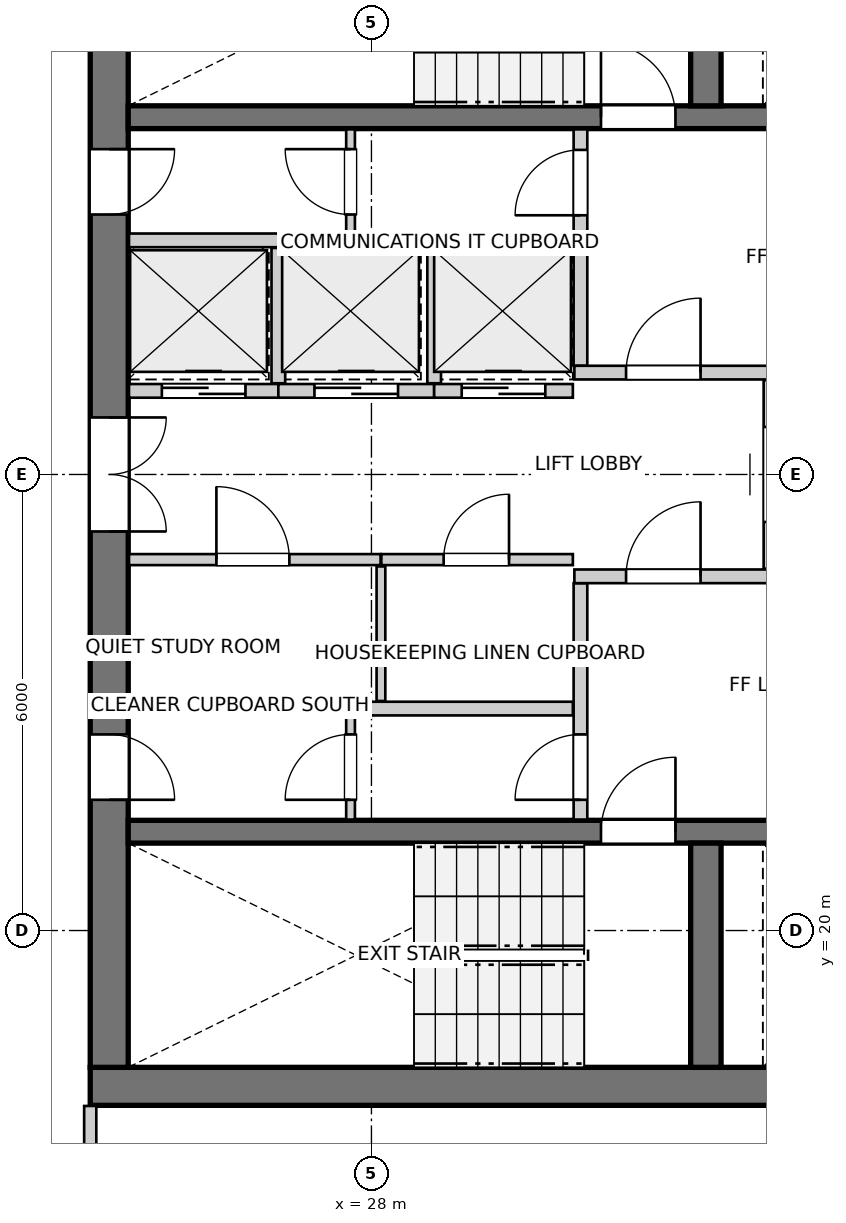
"""IFC4 building model, lengths in metres.
Left out: names, types, materials, properties, quantities, classifications, styles, units other than length and angle.
Written with IfcOpenShell. Run it as: python <this file> out.ifc"""

import sys

from ifc_helpers import new_model, si_unit, direction, frame, frame_2d, origin, place, context, subcontext, project, spatial, rectangle, extrude, source, transform, mapped, element, fill, save


model = new_model("IFC4")
c1 = context("Model", 3, precision=1e-05, world=origin(), true_north=direction((0.0, 1.0)))
c2 = subcontext(c1, "Body", "Model", "MODEL_VIEW")
j1 = project(units=[si_unit("LENGTHUNIT", "METRE"), si_unit("PLANEANGLEUNIT", "RADIAN")], contexts=[c1])
p1 = place(None, origin())
s1 = spatial("IfcSite", under=j1, at=p1, CompositionType="ELEMENT")
p2 = place(p1, origin())
s2 = spatial("IfcBuilding", under=s1, at=p2, CompositionType="ELEMENT")
p3 = place(p2, frame((0.0, 0.0, 211.6)))
s3 = spatial("IfcBuildingStorey", under=s2, at=p3, CompositionType="ELEMENT", Elevation=211.6)
p4 = place(p3, frame((24.3, 17.95, 0.0), z_axis=(0.0, 0.0, 1.0), x_axis=(1.0, 0.0, 0.0)))
e1 = element("IfcWall", 1, at=p4, inside=s3, PredefinedType="SHEAR", context=c2, shape_type="SweptSolid", body=[
    extrude(rectangle(XDim=12.1, YDim=0.5, at=frame_2d((6.05, 0.0))), origin(), (0.0, 0.0, 1.0), 2.96),
])
p5 = place(p3, frame((24.55, 33.8, 0.0), z_axis=(0.0, 0.0, 1.0), x_axis=(0.0, -1.0, 0.0)))
e2 = element("IfcWall", 2, at=p5, inside=s3, PredefinedType="SHEAR", context=c2, shape_type="SweptSolid", body=[
    extrude(rectangle(XDim=15.6, YDim=0.5, at=frame_2d((7.8, 0.0))), origin(), (0.0, 0.0, 1.0), 2.96),
])
p6 = place(p5, frame((7.05, 0.0, 0.0)))
e3 = element("IfcOpeningElement", 3, at=p6, cuts=e2, PredefinedType="OPENING", context=c2, shape_type="SweptSolid", body=[
    extrude(rectangle(XDim=1.5, YDim=2.15, at=frame_2d((0.75, 1.075))), frame((0.0, 0.26, 0.0), z_axis=(0.0, -1.0, 0.0), x_axis=(1.0, 0.0, 0.0)), (0.0, 0.0, 1.0), 0.52),
])
p7 = place(p5, frame((3.52, 0.0, 0.0)))
e4 = element("IfcOpeningElement", 4, at=p7, cuts=e2, PredefinedType="OPENING", context=c2, shape_type="SweptSolid", body=[
    extrude(rectangle(XDim=0.86, YDim=2.05, at=frame_2d((0.43, 1.025))), frame((0.0, 0.26, 0.0), z_axis=(0.0, -1.0, 0.0), x_axis=(1.0, 0.0, 0.0)), (0.0, 0.0, 1.0), 0.52),
])
p8 = place(p5, frame((11.22, 0.0, 0.0)))
e5 = element("IfcOpeningElement", 5, at=p8, cuts=e2, PredefinedType="OPENING", context=c2, shape_type="SweptSolid", body=[
    extrude(rectangle(XDim=0.86, YDim=2.05, at=frame_2d((0.43, 1.025))), frame((0.0, 0.26, 0.0), z_axis=(0.0, -1.0, 0.0), x_axis=(1.0, 0.0, 0.0)), (0.0, 0.0, 1.0), 0.52),
])
p9 = place(p3, frame((24.8, 21.3, 0.0), z_axis=(0.0, 0.0, 1.0), x_axis=(1.0, 0.0, 0.0)))
e6 = element("IfcWall", 6, at=p9, inside=s3, PredefinedType="SHEAR", context=c2, shape_type="SweptSolid", body=[
    extrude(rectangle(XDim=11.1, YDim=0.3, at=frame_2d((5.55, 0.0))), origin(), (0.0, 0.0, 1.0), 2.96),
])
p10 = place(p9, frame((6.22, 0.0, 0.0)))
e7 = element("IfcOpeningElement", 7, at=p10, cuts=e6, PredefinedType="OPENING", context=c2, shape_type="SweptSolid", body=[
    extrude(rectangle(XDim=0.98, YDim=2.15, at=frame_2d((0.49, 1.075))), frame((0.0, 0.16, 0.0), z_axis=(0.0, -1.0, 0.0), x_axis=(1.0, 0.0, 0.0)), (0.0, 0.0, 1.0), 0.32),
])
p11 = place(p9, frame((9.15, 0.0, 0.0)))
e8 = element("IfcOpeningElement", 8, at=p11, cuts=e6, PredefinedType="OPENING", context=c2, shape_type="SweptSolid", body=[
    extrude(rectangle(XDim=1.15, YDim=2.15, at=frame_2d((0.575, 1.075))), frame((0.0, 0.16, 0.0), z_axis=(0.0, -1.0, 0.0), x_axis=(1.0, 0.0, 0.0)), (0.0, 0.0, 1.0), 0.32),
])
p12 = place(p3, frame((32.4, 18.2, 0.0), z_axis=(0.0, 0.0, 1.0), x_axis=(0.0, 1.0, 0.0)))
e9 = element("IfcWall", 9, at=p12, inside=s3, PredefinedType="SHEAR", context=c2, shape_type="SweptSolid", body=[
    extrude(rectangle(XDim=2.95, YDim=0.4, at=frame_2d((1.475, 0.0))), origin(), (0.0, 0.0, 1.0), 2.96),
])
p13 = place(p3, frame((24.8, 30.7, 0.0), z_axis=(0.0, 0.0, 1.0), x_axis=(1.0, 0.0, 0.0)))
e10 = element("IfcWall", 10, at=p13, inside=s3, PredefinedType="SHEAR", context=c2, shape_type="SweptSolid", body=[
    extrude(rectangle(XDim=11.1, YDim=0.3, at=frame_2d((5.55, 0.0))), origin(), (0.0, 0.0, 1.0), 2.96),
])
p14 = place(p13, frame((6.22, 0.0, 0.0)))
e11 = element("IfcOpeningElement", 11, at=p14, cuts=e10, PredefinedType="OPENING", context=c2, shape_type="SweptSolid", body=[
    extrude(rectangle(XDim=0.98, YDim=2.15, at=frame_2d((0.49, 1.075))), frame((0.0, 0.16, 0.0), z_axis=(0.0, -1.0, 0.0), x_axis=(1.0, 0.0, 0.0)), (0.0, 0.0, 1.0), 0.32),
])
p15 = place(p13, frame((9.15, 0.0, 0.0)))
e12 = element("IfcOpeningElement", 12, at=p15, cuts=e10, PredefinedType="OPENING", context=c2, shape_type="SweptSolid", body=[
    extrude(rectangle(XDim=1.15, YDim=2.15, at=frame_2d((0.575, 1.075))), frame((0.0, 0.16, 0.0), z_axis=(0.0, -1.0, 0.0), x_axis=(1.0, 0.0, 0.0)), (0.0, 0.0, 1.0), 0.32),
])
p16 = place(p3, frame((32.4, 30.85, 0.0), z_axis=(0.0, 0.0, 1.0), x_axis=(0.0, 1.0, 0.0)))
e13 = element("IfcWall", 13, at=p16, inside=s3, PredefinedType="SHEAR", context=c2, shape_type="SweptSolid", body=[
    extrude(rectangle(XDim=2.95, YDim=0.4, at=frame_2d((1.475, 0.0))), origin(), (0.0, 0.0, 1.0), 2.96),
])
p17 = place(p3, frame((30.75, 21.46, 0.0), z_axis=(0.0, 0.0, 1.0), x_axis=(0.0, 1.0, 0.0)))
e14 = element("IfcWall", 14, at=p17, inside=s3, PredefinedType="PARTITIONING", context=c2, shape_type="SweptSolid", body=[
    extrude(rectangle(XDim=3.11, YDim=0.18, at=frame_2d((1.555, 0.0))), origin(), (0.0, 0.0, 1.0), 2.96),
])
p18 = place(p17, frame((0.26, 0.0, 0.0)))
e15 = element("IfcOpeningElement", 15, at=p18, cuts=e14, PredefinedType="OPENING", context=c2, shape_type="SweptSolid", body=[
    extrude(rectangle(XDim=0.86, YDim=2.05, at=frame_2d((0.43, 1.025))), frame((0.0, 0.1, 0.0), z_axis=(0.0, -1.0, 0.0), x_axis=(1.0, 0.0, 0.0)), (0.0, 0.0, 1.0), 0.2),
])
p19 = place(p3, frame((30.67, 24.66, 0.0), z_axis=(0.0, 0.0, 1.0), x_axis=(1.0, 0.0, 0.0)))
e16 = element("IfcWall", 16, at=p19, inside=s3, PredefinedType="PARTITIONING", context=c2, shape_type="SweptSolid", body=[
    extrude(rectangle(XDim=5.22, YDim=0.18, at=frame_2d((2.61, 0.0))), origin(), (0.0, 0.0, 1.0), 2.96),
])
p20 = place(p19, frame((0.68, 0.0, 0.0)))
e17 = element("IfcOpeningElement", 17, at=p20, cuts=e16, PredefinedType="OPENING", context=c2, shape_type="SweptSolid", body=[
    extrude(rectangle(XDim=0.98, YDim=2.15, at=frame_2d((0.49, 1.075))), frame((0.0, 0.1, 0.0), z_axis=(0.0, -1.0, 0.0), x_axis=(1.0, 0.0, 0.0)), (0.0, 0.0, 1.0), 0.2),
])
p21 = place(p3, frame((30.75, 27.43, 0.0), z_axis=(0.0, 0.0, 1.0), x_axis=(0.0, 1.0, 0.0)))
e18 = element("IfcWall", 18, at=p21, inside=s3, PredefinedType="PARTITIONING", context=c2, shape_type="SweptSolid", body=[
    extrude(rectangle(XDim=3.11, YDim=0.18, at=frame_2d((1.555, 0.0))), origin(), (0.0, 0.0, 1.0), 2.96),
])
p22 = place(p21, frame((1.98, 0.0, 0.0)))
e19 = element("IfcOpeningElement", 19, at=p22, cuts=e18, PredefinedType="OPENING", context=c2, shape_type="SweptSolid", body=[
    extrude(rectangle(XDim=0.86, YDim=2.05, at=frame_2d((0.43, 1.025))), frame((0.0, 0.1, 0.0), z_axis=(0.0, -1.0, 0.0), x_axis=(1.0, 0.0, 0.0)), (0.0, 0.0, 1.0), 0.2),
])
p23 = place(p3, frame((30.67, 27.34, 0.0), z_axis=(0.0, 0.0, 1.0), x_axis=(1.0, 0.0, 0.0)))
e20 = element("IfcWall", 20, at=p23, inside=s3, PredefinedType="PARTITIONING", context=c2, shape_type="SweptSolid", body=[
    extrude(rectangle(XDim=5.22, YDim=0.18, at=frame_2d((2.61, 0.0))), origin(), (0.0, 0.0, 1.0), 2.96),
])
p24 = place(p23, frame((0.68, 0.0, 0.0)))
e21 = element("IfcOpeningElement", 21, at=p24, cuts=e20, PredefinedType="OPENING", context=c2, shape_type="SweptSolid", body=[
    extrude(rectangle(XDim=0.98, YDim=2.15, at=frame_2d((0.49, 1.075))), frame((0.0, 0.1, 0.0), z_axis=(0.0, -1.0, 0.0), x_axis=(1.0, 0.0, 0.0)), (0.0, 0.0, 1.0), 0.2),
])
p25 = place(p3, frame((33.25, 24.76, 0.0), z_axis=(0.0, 0.0, 1.0), x_axis=(0.0, 1.0, 0.0)))
e22 = element("IfcWall", 22, at=p25, inside=s3, PredefinedType="PARTITIONING", context=c2, shape_type="SweptSolid", body=[
    extrude(rectangle(XDim=2.48, YDim=0.18, at=frame_2d((1.24, 0.0))), origin(), (0.0, 0.0, 1.0), 2.96),
])
p26 = place(p25, frame((0.615, 0.0, 0.0)))
e23 = element("IfcOpeningElement", 23, at=p26, cuts=e22, PredefinedType="OPENING", context=c2, shape_type="SweptSolid", body=[
    extrude(rectangle(XDim=1.25, YDim=2.15, at=frame_2d((0.625, 1.075))), frame((0.0, 0.1, 0.0), z_axis=(0.0, -1.0, 0.0), x_axis=(1.0, 0.0, 0.0)), (0.0, 0.0, 1.0), 0.2),
])
p27 = place(p3, frame((24.81, 22.92, 0.0), z_axis=(0.0, 0.0, 1.0), x_axis=(1.0, 0.0, 0.0)))
e24 = element("IfcWall", 24, at=p27, inside=s3, PredefinedType="PARTITIONING", context=c2, shape_type="SweptSolid", body=[
    extrude(rectangle(XDim=5.84, YDim=0.18, at=frame_2d((2.92, 0.0))), origin(), (0.0, 0.0, 1.0), 2.96),
])
p28 = place(p3, frame((24.81, 24.88, 0.0), z_axis=(0.0, 0.0, 1.0), x_axis=(1.0, 0.0, 0.0)))
e25 = element("IfcWall", 25, at=p28, inside=s3, PredefinedType="PARTITIONING", context=c2, shape_type="SweptSolid", body=[
    extrude(rectangle(XDim=3.31, YDim=0.145, at=frame_2d((1.655, 0.0))), origin(), (0.0, 0.0, 1.0), 2.96),
])
p29 = place(p28, frame((1.15, 0.0, 0.0)))
e26 = element("IfcOpeningElement", 26, at=p29, cuts=e25, PredefinedType="OPENING", context=c2, shape_type="SweptSolid", body=[
    extrude(rectangle(XDim=0.96, YDim=2.1, at=frame_2d((0.48, 1.05))), frame((0.0, 0.083, 0.0), z_axis=(0.0, -1.0, 0.0), x_axis=(1.0, 0.0, 0.0)), (0.0, 0.0, 1.0), 0.165),
])
p30 = place(p3, frame((28.13, 24.88, 0.0), z_axis=(0.0, 0.0, 1.0), x_axis=(1.0, 0.0, 0.0)))
e27 = element("IfcWall", 27, at=p30, inside=s3, PredefinedType="PARTITIONING", context=c2, shape_type="SweptSolid", body=[
    extrude(rectangle(XDim=2.52, YDim=0.145, at=frame_2d((1.26, 0.0))), origin(), (0.0, 0.0, 1.0), 2.96),
])
p31 = place(p30, frame((0.82, 0.0, 0.0)))
e28 = element("IfcOpeningElement", 28, at=p31, cuts=e27, PredefinedType="OPENING", context=c2, shape_type="SweptSolid", body=[
    extrude(rectangle(XDim=0.86, YDim=2.05, at=frame_2d((0.43, 1.025))), frame((0.0, 0.083, 0.0), z_axis=(0.0, -1.0, 0.0), x_axis=(1.0, 0.0, 0.0)), (0.0, 0.0, 1.0), 0.165),
])
p32 = place(p3, frame((28.125, 23.02, 0.0), z_axis=(0.0, 0.0, 1.0), x_axis=(0.0, 1.0, 0.0)))
e29 = element("IfcWall", 29, at=p32, inside=s3, PredefinedType="PARTITIONING", context=c2, shape_type="SweptSolid", body=[
    extrude(rectangle(XDim=1.77, YDim=0.115, at=frame_2d((0.885, 0.0))), origin(), (0.0, 0.0, 1.0), 2.96),
])
p33 = place(p3, frame((24.81, 29.08, 0.0), z_axis=(0.0, 0.0, 1.0), x_axis=(1.0, 0.0, 0.0)))
e30 = element("IfcWall", 30, at=p33, inside=s3, PredefinedType="PARTITIONING", context=c2, shape_type="SweptSolid", body=[
    extrude(rectangle(XDim=5.84, YDim=0.18, at=frame_2d((2.92, 0.0))), origin(), (0.0, 0.0, 1.0), 2.96),
])
p34 = place(p3, frame((24.81, 27.1, 0.0), z_axis=(0.0, 0.0, 1.0), x_axis=(1.0, 0.0, 0.0)))
e31 = element("IfcWall", 31, at=p34, inside=s3, PredefinedType="PARTITIONING", context=c2, shape_type="SweptSolid", body=[
    extrude(rectangle(XDim=1.965, YDim=0.18, at=frame_2d((0.982, 0.0))), origin(), (0.0, 0.0, 1.0), 2.96),
])
p35 = place(p34, frame((0.433, 0.0, 0.0)))
e32 = element("IfcOpeningElement", 32, at=p35, cuts=e31, PredefinedType="OPENING", context=c2, shape_type="SweptSolid", body=[
    extrude(rectangle(XDim=1.1, YDim=2.15, at=frame_2d((0.55, 1.075))), frame((0.0, 0.1, 0.0), z_axis=(0.0, -1.0, 0.0), x_axis=(1.0, 0.0, 0.0)), (0.0, 0.0, 1.0), 0.2),
])
p36 = place(p3, frame((26.775, 27.1, 0.0), z_axis=(0.0, 0.0, 1.0), x_axis=(1.0, 0.0, 0.0)))
e33 = element("IfcWall", 33, at=p36, inside=s3, PredefinedType="PARTITIONING", context=c2, shape_type="SweptSolid", body=[
    extrude(rectangle(XDim=2.05, YDim=0.18, at=frame_2d((1.025, 0.0))), origin(), (0.0, 0.0, 1.0), 2.96),
])
p37 = place(p36, frame((0.475, 0.0, 0.0)))
e34 = element("IfcOpeningElement", 34, at=p37, cuts=e33, PredefinedType="OPENING", context=c2, shape_type="SweptSolid", body=[
    extrude(rectangle(XDim=1.1, YDim=2.15, at=frame_2d((0.55, 1.075))), frame((0.0, 0.1, 0.0), z_axis=(0.0, -1.0, 0.0), x_axis=(1.0, 0.0, 0.0)), (0.0, 0.0, 1.0), 0.2),
])
p38 = place(p3, frame((26.775, 27.2, 0.0), z_axis=(0.0, 0.0, 1.0), x_axis=(0.0, 1.0, 0.0)))
e35 = element("IfcWall", 35, at=p38, inside=s3, PredefinedType="PARTITIONING", context=c2, shape_type="SweptSolid", body=[
    extrude(rectangle(XDim=1.78, YDim=0.18, at=frame_2d((0.89, 0.0))), origin(), (0.0, 0.0, 1.0), 2.96),
])
p39 = place(p3, frame((28.825, 27.1, 0.0), z_axis=(0.0, 0.0, 1.0), x_axis=(1.0, 0.0, 0.0)))
e36 = element("IfcWall", 36, at=p39, inside=s3, PredefinedType="PARTITIONING", context=c2, shape_type="SweptSolid", body=[
    extrude(rectangle(XDim=1.825, YDim=0.18, at=frame_2d((0.913, 0.0))), origin(), (0.0, 0.0, 1.0), 2.96),
])
p40 = place(p39, frame((0.363, 0.0, 0.0)))
e37 = element("IfcOpeningElement", 37, at=p40, cuts=e36, PredefinedType="OPENING", context=c2, shape_type="SweptSolid", body=[
    extrude(rectangle(XDim=1.1, YDim=2.15, at=frame_2d((0.55, 1.075))), frame((0.0, 0.1, 0.0), z_axis=(0.0, -1.0, 0.0), x_axis=(1.0, 0.0, 0.0)), (0.0, 0.0, 1.0), 0.2),
])
p41 = place(p3, frame((28.825, 27.2, 0.0), z_axis=(0.0, 0.0, 1.0), x_axis=(0.0, 1.0, 0.0)))
e38 = element("IfcWall", 38, at=p41, inside=s3, PredefinedType="PARTITIONING", context=c2, shape_type="SweptSolid", body=[
    extrude(rectangle(XDim=1.78, YDim=0.18, at=frame_2d((0.89, 0.0))), origin(), (0.0, 0.0, 1.0), 2.96),
])
p42 = place(p3, frame((27.725, 21.46, 0.0), z_axis=(0.0, 0.0, 1.0), x_axis=(0.0, 1.0, 0.0)))
e39 = element("IfcWall", 39, at=p42, inside=s3, PredefinedType="PARTITIONING", context=c2, shape_type="SweptSolid", body=[
    extrude(rectangle(XDim=1.38, YDim=0.115, at=frame_2d((0.69, 0.0))), origin(), (0.0, 0.0, 1.0), 2.96),
])
p43 = place(p42, frame((0.26, 0.0, 0.0)))
e40 = element("IfcOpeningElement", 40, at=p43, cuts=e39, PredefinedType="OPENING", context=c2, shape_type="SweptSolid", body=[
    extrude(rectangle(XDim=0.86, YDim=2.05, at=frame_2d((0.43, 1.025))), frame((0.0, 0.067, 0.0), z_axis=(0.0, -1.0, 0.0), x_axis=(1.0, 0.0, 0.0)), (0.0, 0.0, 1.0), 0.135),
])
p44 = place(p3, frame((27.725, 29.16, 0.0), z_axis=(0.0, 0.0, 1.0), x_axis=(0.0, 1.0, 0.0)))
e41 = element("IfcWall", 41, at=p44, inside=s3, PredefinedType="PARTITIONING", context=c2, shape_type="SweptSolid", body=[
    extrude(rectangle(XDim=1.38, YDim=0.115, at=frame_2d((0.69, 0.0))), origin(), (0.0, 0.0, 1.0), 2.96),
])
p45 = place(p44, frame((0.26, 0.0, 0.0)))
e42 = element("IfcOpeningElement", 42, at=p45, cuts=e41, PredefinedType="OPENING", context=c2, shape_type="SweptSolid", body=[
    extrude(rectangle(XDim=0.86, YDim=2.05, at=frame_2d((0.43, 1.025))), frame((0.0, 0.067, 0.0), z_axis=(0.0, -1.0, 0.0), x_axis=(1.0, 0.0, 0.0)), (0.0, 0.0, 1.0), 0.135),
])
p46 = place(p3, frame((24.3, 15.002, 0.0), z_axis=(0.0, 0.0, 1.0), x_axis=(0.0, 1.0, 0.0)))
e43 = element("IfcWall", 43, at=p46, inside=s3, PredefinedType="PARTITIONING", context=c2, shape_type="SweptSolid", body=[
    extrude(rectangle(XDim=2.69, YDim=0.16, at=frame_2d((1.345, 0.0))), origin(), (0.0, 0.0, 1.0), 2.96),
])
m1 = source(origin(), c2, "Body", "SweptSolid", [
    extrude(rectangle(XDim=0.98, YDim=2.15, at=frame_2d((0.49, 1.075))), frame((0.0, 0.025, 0.0), z_axis=(0.0, -1.0, 0.0), x_axis=(1.0, 0.0, 0.0)), (0.0, 0.0, 1.0), 0.05),
])
p47 = place(p10, origin())
e44 = element("IfcDoor", 44, at=p47, inside=s3, OperationType="SINGLE_SWING_RIGHT", PredefinedType="DOOR", context=c2, shape_type="MappedRepresentation", body=[
    mapped(m1, transform((0.0, 0.0, 0.0), x_axis=(1.0, 0.0, 0.0), y_axis=(0.0, 1.0, 0.0), z_axis=(0.0, 0.0, 1.0), scale=1.0)),
])
fill(e7, e44)
p48 = place(p14, origin())
e45 = element("IfcDoor", 45, at=p48, inside=s3, OperationType="SINGLE_SWING_LEFT", PredefinedType="DOOR", context=c2, shape_type="MappedRepresentation", body=[
    mapped(m1, transform((0.0, 0.0, 0.0), x_axis=(1.0, 0.0, 0.0), y_axis=(0.0, 1.0, 0.0), z_axis=(0.0, 0.0, 1.0), scale=1.0)),
])
fill(e11, e45)
m2 = source(origin(), c2, "Body", "SweptSolid", [
    extrude(rectangle(XDim=1.5, YDim=2.15, at=frame_2d((0.75, 1.075))), frame((0.0, 0.025, 0.0), z_axis=(0.0, -1.0, 0.0), x_axis=(1.0, 0.0, 0.0)), (0.0, 0.0, 1.0), 0.05),
])
p49 = place(p6, origin())
e46 = element("IfcDoor", 46, at=p49, inside=s3, OperationType="DOUBLE_DOOR_SINGLE_SWING", PredefinedType="DOOR", context=c2, shape_type="MappedRepresentation", body=[
    mapped(m2, transform((0.0, 0.0, 0.0), x_axis=(1.0, 0.0, 0.0), y_axis=(0.0, 1.0, 0.0), z_axis=(0.0, 0.0, 1.0), scale=1.0)),
])
fill(e3, e46)
m3 = source(origin(), c2, "Body", "SweptSolid", [
    extrude(rectangle(XDim=0.86, YDim=2.05, at=frame_2d((0.43, 1.025))), frame((0.0, 0.025, 0.0), z_axis=(0.0, -1.0, 0.0), x_axis=(1.0, 0.0, 0.0)), (0.0, 0.0, 1.0), 0.05),
])
p50 = place(p7, origin())
e47 = element("IfcDoor", 47, at=p50, inside=s3, OperationType="SINGLE_SWING_LEFT", PredefinedType="DOOR", context=c2, shape_type="MappedRepresentation", body=[
    mapped(m3, transform((0.0, 0.0, 0.0), x_axis=(1.0, 0.0, 0.0), y_axis=(0.0, 1.0, 0.0), z_axis=(0.0, 0.0, 1.0), scale=1.0)),
])
fill(e4, e47)
p51 = place(p8, origin())
e48 = element("IfcDoor", 48, at=p51, inside=s3, OperationType="SINGLE_SWING_RIGHT", PredefinedType="DOOR", context=c2, shape_type="MappedRepresentation", body=[
    mapped(m3, transform((0.0, 0.0, 0.0), x_axis=(1.0, 0.0, 0.0), y_axis=(0.0, 1.0, 0.0), z_axis=(0.0, 0.0, 1.0), scale=1.0)),
])
fill(e5, e48)
p52 = place(p18, origin())
e49 = element("IfcDoor", 49, at=p52, inside=s3, OperationType="SINGLE_SWING_LEFT", PredefinedType="DOOR", context=c2, shape_type="MappedRepresentation", body=[
    mapped(m3, transform((0.0, 0.0, 0.0), x_axis=(1.0, 0.0, 0.0), y_axis=(0.0, 1.0, 0.0), z_axis=(0.0, 0.0, 1.0), scale=1.0)),
])
fill(e15, e49)
p53 = place(p20, origin())
e50 = element("IfcDoor", 50, at=p53, inside=s3, OperationType="SINGLE_SWING_RIGHT", PredefinedType="DOOR", context=c2, shape_type="MappedRepresentation", body=[
    mapped(m1, transform((0.0, 0.0, 0.0), x_axis=(1.0, 0.0, 0.0), y_axis=(0.0, 1.0, 0.0), z_axis=(0.0, 0.0, 1.0), scale=1.0)),
])
fill(e17, e50)
p54 = place(p22, origin())
e51 = element("IfcDoor", 51, at=p54, inside=s3, OperationType="SINGLE_SWING_LEFT", PredefinedType="DOOR", context=c2, shape_type="MappedRepresentation", body=[
    mapped(m3, transform((0.0, 0.0, 0.0), x_axis=(1.0, 0.0, 0.0), y_axis=(0.0, 1.0, 0.0), z_axis=(0.0, 0.0, 1.0), scale=1.0)),
])
fill(e19, e51)
p55 = place(p24, origin())
e52 = element("IfcDoor", 52, at=p55, inside=s3, OperationType="SINGLE_SWING_RIGHT", PredefinedType="DOOR", context=c2, shape_type="MappedRepresentation", body=[
    mapped(m1, transform((0.0, 0.0, 0.0), x_axis=(1.0, 0.0, 0.0), y_axis=(0.0, 1.0, 0.0), z_axis=(0.0, 0.0, 1.0), scale=1.0)),
])
fill(e21, e52)
m4 = source(origin(), c2, "Body", "SweptSolid", [
    extrude(rectangle(XDim=0.96, YDim=2.1, at=frame_2d((0.48, 1.05))), frame((0.0, 0.025, 0.0), z_axis=(0.0, -1.0, 0.0), x_axis=(1.0, 0.0, 0.0)), (0.0, 0.0, 1.0), 0.05),
])
p56 = place(p29, origin())
e53 = element("IfcDoor", 53, at=p56, inside=s3, OperationType="SINGLE_SWING_LEFT", PredefinedType="DOOR", context=c2, shape_type="MappedRepresentation", body=[
    mapped(m4, transform((0.0, 0.0, 0.0), x_axis=(1.0, 0.0, 0.0), y_axis=(0.0, 1.0, 0.0), z_axis=(0.0, 0.0, 1.0), scale=1.0)),
])
fill(e26, e53)
p57 = place(p31, origin())
e54 = element("IfcDoor", 54, at=p57, inside=s3, OperationType="SINGLE_SWING_RIGHT", PredefinedType="DOOR", context=c2, shape_type="MappedRepresentation", body=[
    mapped(m3, transform((0.0, 0.0, 0.0), x_axis=(1.0, 0.0, 0.0), y_axis=(0.0, 1.0, 0.0), z_axis=(0.0, 0.0, 1.0), scale=1.0)),
])
fill(e28, e54)
m5 = source(origin(), c2, "Body", "SweptSolid", [
    extrude(rectangle(XDim=1.1, YDim=2.15, at=frame_2d((0.55, 1.075))), frame((0.0, 0.025, 0.0), z_axis=(0.0, -1.0, 0.0), x_axis=(1.0, 0.0, 0.0)), (0.0, 0.0, 1.0), 0.05),
])
p58 = place(p35, origin())
e55 = element("IfcDoor", 55, at=p58, inside=s3, OperationType="DOUBLE_DOOR_SLIDING", PredefinedType="DOOR", context=c2, shape_type="MappedRepresentation", body=[
    mapped(m5, transform((0.0, 0.0, 0.0), x_axis=(1.0, 0.0, 0.0), y_axis=(0.0, 1.0, 0.0), z_axis=(0.0, 0.0, 1.0), scale=1.0)),
])
fill(e32, e55)
p59 = place(p37, origin())
e56 = element("IfcDoor", 56, at=p59, inside=s3, OperationType="DOUBLE_DOOR_SLIDING", PredefinedType="DOOR", context=c2, shape_type="MappedRepresentation", body=[
    mapped(m5, transform((0.0, 0.0, 0.0), x_axis=(1.0, 0.0, 0.0), y_axis=(0.0, 1.0, 0.0), z_axis=(0.0, 0.0, 1.0), scale=1.0)),
])
fill(e34, e56)
p60 = place(p40, origin())
e57 = element("IfcDoor", 57, at=p60, inside=s3, OperationType="DOUBLE_DOOR_SLIDING", PredefinedType="DOOR", context=c2, shape_type="MappedRepresentation", body=[
    mapped(m5, transform((0.0, 0.0, 0.0), x_axis=(1.0, 0.0, 0.0), y_axis=(0.0, 1.0, 0.0), z_axis=(0.0, 0.0, 1.0), scale=1.0)),
])
fill(e37, e57)
p61 = place(p43, origin())
e58 = element("IfcDoor", 58, at=p61, inside=s3, OperationType="SINGLE_SWING_LEFT", PredefinedType="DOOR", context=c2, shape_type="MappedRepresentation", body=[
    mapped(m3, transform((0.0, 0.0, 0.0), x_axis=(1.0, 0.0, 0.0), y_axis=(0.0, 1.0, 0.0), z_axis=(0.0, 0.0, 1.0), scale=1.0)),
])
fill(e40, e58)
p62 = place(p45, origin())
e59 = element("IfcDoor", 59, at=p62, inside=s3, OperationType="SINGLE_SWING_RIGHT", PredefinedType="DOOR", context=c2, shape_type="MappedRepresentation", body=[
    mapped(m3, transform((0.0, 0.0, 0.0), x_axis=(1.0, 0.0, 0.0), y_axis=(0.0, 1.0, 0.0), z_axis=(0.0, 0.0, 1.0), scale=1.0)),
])
fill(e42, e59)
save(model, sys.argv[1])
